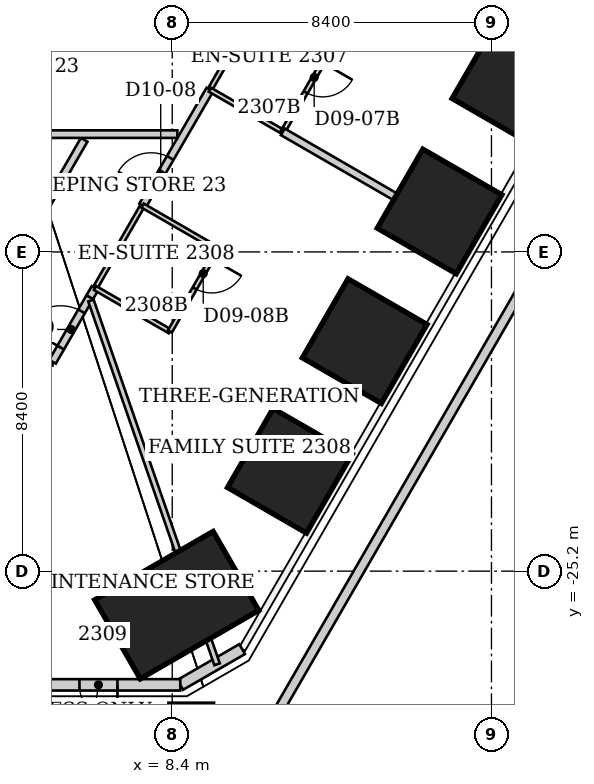
"""IFC4 building model, lengths in metres.
Left out: names, types, materials, properties, quantities, classifications, styles, units other than length and angle.
Written with IfcOpenShell. Run it as: python <this file> out.ifc"""

import sys

from ifc_helpers import new_model, si_unit, direction, frame, frame_2d, origin, origin_2d, place, context, subcontext, project, spatial, rectangle, extrude, clip, halfspace, element, fill, save


model = new_model("IFC4")
c1 = context("Model", 3, precision=1e-05, world=origin(), true_north=direction((0.0, 1.0)))
c2 = subcontext(c1, "Body", "Model", "MODEL_VIEW")
j1 = project(units=[si_unit("LENGTHUNIT", "METRE"), si_unit("PLANEANGLEUNIT", "RADIAN")], contexts=[c1])
p1 = place(None, origin())
s1 = spatial("IfcSite", under=j1, at=p1, CompositionType="ELEMENT")
p2 = place(p1, origin())
s2 = spatial("IfcBuilding", under=s1, at=p2, CompositionType="ELEMENT")
p3 = place(p2, frame((0.0, 0.0, 96.8)))
s3 = spatial("IfcBuildingStorey", under=s2, at=p3, CompositionType="ELEMENT", Elevation=96.8)
p4 = place(p3, frame((17.404, -12.323, -0.048), z_axis=(0.0, 0.0, 1.0), x_axis=(0.866025403784, -0.5, 0.0)))
e1 = element("IfcColumn", 1, at=p4, inside=s3, PredefinedType="COLUMN", context=c2, shape_type="SweptSolid", body=[
    clip(extrude(rectangle(XDim=2.4, YDim=2.4, at=origin_2d()), origin(), (0.0, 0.0, 1.0), 3.848), halfspace(frame((0.0, 0.0, 0.048)), True)),
])
p5 = place(p3, frame((15.434, -15.735, -0.056), z_axis=(0.0, 0.0, 1.0), x_axis=(0.866025403784, -0.5, 0.0)))
e2 = element("IfcColumn", 2, at=p5, inside=s3, PredefinedType="COLUMN", context=c2, shape_type="SweptSolid", body=[
    clip(extrude(rectangle(XDim=2.4, YDim=2.4, at=origin_2d()), origin(), (0.0, 0.0, 1.0), 3.856), halfspace(frame((0.0, 0.0, 0.056)), True)),
])
p6 = place(p3, frame((13.464, -19.147, -0.064), z_axis=(0.0, 0.0, 1.0), x_axis=(0.866025403784, -0.5, 0.0)))
e3 = element("IfcColumn", 3, at=p6, inside=s3, PredefinedType="COLUMN", context=c2, shape_type="SweptSolid", body=[
    clip(extrude(rectangle(XDim=2.4, YDim=2.4, at=origin_2d()), origin(), (0.0, 0.0, 1.0), 3.865), halfspace(frame((0.0, 0.0, 0.064)), True)),
])
p7 = place(p3, frame((11.494, -22.559, -0.073), z_axis=(0.0, 0.0, 1.0), x_axis=(0.866025403784, -0.5, 0.0)))
e4 = element("IfcColumn", 4, at=p7, inside=s3, PredefinedType="COLUMN", context=c2, shape_type="SweptSolid", body=[
    clip(extrude(rectangle(XDim=2.4, YDim=2.4, at=origin_2d()), origin(), (0.0, 0.0, 1.0), 3.873), halfspace(frame((0.0, 0.0, 0.073)), True)),
])
p8 = place(p3, frame((8.518, -26.094, -0.074), z_axis=(0.0, 0.0, 1.0), x_axis=(0.5, -0.866025403784, 0.0)))
e5 = element("IfcColumn", 5, at=p8, inside=s3, PredefinedType="COLUMN", context=c2, shape_type="SweptSolid", body=[
    clip(extrude(rectangle(XDim=2.4, YDim=3.6, at=origin_2d()), origin(), (0.0, 0.0, 1.0), 3.874), halfspace(frame((0.0, 0.0, 0.074)), True)),
])
p9 = place(p3, frame((10.24, -27.252, 0.0), z_axis=(0.0, 0.0, 1.0), x_axis=(-0.866045024864, -0.499966013754, 0.0)))
e6 = element("IfcWall", 6, at=p9, inside=s3, PredefinedType="SOLIDWALL", context=c2, shape_type="SweptSolid", body=[
    extrude(rectangle(XDim=1.88, YDim=0.3, at=frame_2d((0.94, 0.0))), origin(), (0.0, 0.0, 1.0), 3.64),
])
p10 = place(p3, frame((8.611, -28.192, 0.0), z_axis=(0.0, 0.0, 1.0), x_axis=(-1.0, 0.0, 0.0)))
e7 = element("IfcWall", 7, at=p10, inside=s3, PredefinedType="SOLIDWALL", context=c2, shape_type="SweptSolid", body=[
    extrude(rectangle(XDim=4.306, YDim=0.3, at=frame_2d((2.153, 0.0))), origin(), (0.0, 0.0, 1.0), 3.64),
])
p11 = place(p10, frame((1.653, 0.0, 0.0)))
e8 = element("IfcOpeningElement", 8, at=p11, cuts=e7, PredefinedType="OPENING", context=c2, shape_type="SweptSolid", body=[
    extrude(rectangle(XDim=1.0, YDim=2.2, at=frame_2d((0.5, 1.1))), frame((0.0, 0.15, 0.0), z_axis=(0.0, -1.0, 0.0), x_axis=(1.0, 0.0, 0.0)), (0.0, 0.0, 1.0), 0.3),
])
p12 = place(p3, frame((11.024, -29.171, 0.0), z_axis=(0.0, 0.0, 1.0), x_axis=(0.499999235055, 0.866025845425, 0.0)))
e9 = element("IfcWall", 9, at=p12, inside=s3, PredefinedType="PARAPET", context=c2, shape_type="SweptSolid", body=[
    extrude(rectangle(XDim=39.5, YDim=0.25, at=frame_2d((19.75, 0.0))), origin(), (0.0, 0.0, 1.0), 1.1),
])
p13 = place(p3, frame((4.31, -19.69, 0.0), z_axis=(0.0, 0.0, 1.0), x_axis=(1.0, 0.0, 0.0)))
e10 = element("IfcWall", 10, at=p13, inside=s3, PredefinedType="PARTITIONING", context=c2, shape_type="SweptSolid", body=[
    extrude(rectangle(XDim=0.94, YDim=0.2, at=frame_2d((0.47, 0.0))), origin(), (0.0, 0.0, 1.0), 3.64),
])
p14 = place(p3, frame((5.25, -19.69, 0.0), z_axis=(0.0, 0.0, 1.0), x_axis=(0.499431599995, 0.866353321068, 0.0)))
e11 = element("IfcWall", 11, at=p14, inside=s3, PredefinedType="PARTITIONING", context=c2, shape_type="SweptSolid", body=[
    extrude(rectangle(XDim=1.962, YDim=0.2, at=frame_2d((0.981, 0.0))), origin(), (0.0, 0.0, 1.0), 3.64),
])
p15 = place(p14, frame((0.431, 0.0, 0.0)))
e12 = element("IfcOpeningElement", 12, at=p15, cuts=e11, PredefinedType="OPENING", context=c2, shape_type="SweptSolid", body=[
    extrude(rectangle(XDim=1.1, YDim=2.2, at=frame_2d((0.55, 1.1))), frame((0.0, 0.1, 0.0), z_axis=(0.0, -1.0, 0.0), x_axis=(1.0, 0.0, 0.0)), (0.0, 0.0, 1.0), 0.2),
])
p16 = place(p3, frame((6.083, -13.85, 0.0), z_axis=(0.0, 0.0, 1.0), x_axis=(-0.499977643516, -0.866038310922, 0.0)))
e13 = element("IfcWall", 13, at=p16, inside=s3, PredefinedType="PARTITIONING", context=c2, shape_type="SweptSolid", body=[
    extrude(rectangle(XDim=4.665, YDim=0.2, at=frame_2d((2.333, 0.0))), origin(), (0.0, 0.0, 1.0), 3.64),
])
p17 = place(p3, frame((6.23, -17.99, 0.0), z_axis=(0.0, 0.0, 1.0), x_axis=(0.503597773627, 0.863938239921, 0.0)))
e14 = element("IfcWall", 14, at=p17, inside=s3, PredefinedType="PARTITIONING", context=c2, shape_type="SweptSolid", body=[
    extrude(rectangle(XDim=0.278, YDim=0.2, at=frame_2d((0.139, 0.0))), origin(), (0.0, 0.0, 1.0), 3.64),
])
p18 = place(p3, frame((6.37, -17.75, 0.0), z_axis=(0.0, 0.0, 1.0), x_axis=(0.499159685399, 0.866510016372, 0.0)))
e15 = element("IfcWall", 15, at=p18, inside=s3, PredefinedType="PARTITIONING", context=c2, shape_type="SweptSolid", body=[
    extrude(rectangle(XDim=2.504, YDim=0.12, at=frame_2d((1.252, 0.0))), origin(), (0.0, 0.0, 1.0), 3.64),
])
p19 = place(p3, frame((6.37, -17.75, 0.0), z_axis=(0.0, 0.0, 1.0), x_axis=(0.865543766642, -0.500833293649, 0.0)))
e16 = element("IfcWall", 16, at=p19, inside=s3, PredefinedType="PARTITIONING", context=c2, shape_type="SweptSolid", body=[
    extrude(rectangle(XDim=2.276, YDim=0.12, at=frame_2d((1.138, 0.0))), origin(), (0.0, 0.0, 1.0), 3.64),
])
p20 = place(p3, frame((7.62, -15.58, 0.0), z_axis=(0.0, 0.0, 1.0), x_axis=(0.501876608556, 0.864939228954, 0.0)))
e17 = element("IfcWall", 17, at=p20, inside=s3, PredefinedType="PARTITIONING", context=c2, shape_type="SweptSolid", body=[
    extrude(rectangle(XDim=3.526, YDim=0.2, at=frame_2d((1.763, 0.0))), origin(), (0.0, 0.0, 1.0), 3.64),
])
p21 = place(p20, frame((0.45, 0.0, 0.0)))
e18 = element("IfcOpeningElement", 18, at=p21, cuts=e17, PredefinedType="OPENING", context=c2, shape_type="SweptSolid", body=[
    extrude(rectangle(XDim=1.0, YDim=2.13, at=frame_2d((0.5, 1.065))), frame((0.0, 0.1, 0.0), z_axis=(0.0, -1.0, 0.0), x_axis=(1.0, 0.0, 0.0)), (0.0, 0.0, 1.0), 0.2),
])
p22 = place(p3, frame((8.34, -18.89, 0.0), z_axis=(0.0, 0.0, 1.0), x_axis=(0.499159685399, 0.866510016372, 0.0)))
e19 = element("IfcWall", 19, at=p22, inside=s3, PredefinedType="PARTITIONING", context=c2, shape_type="SweptSolid", body=[
    extrude(rectangle(XDim=2.504, YDim=0.12, at=frame_2d((1.252, 0.0))), origin(), (0.0, 0.0, 1.0), 3.64),
])
p23 = place(p22, frame((1.304, 0.0, 0.0)))
e20 = element("IfcOpeningElement", 20, at=p23, cuts=e19, PredefinedType="OPENING", context=c2, shape_type="SweptSolid", body=[
    extrude(rectangle(XDim=0.9, YDim=2.03, at=frame_2d((0.45, 1.015))), frame((0.0, 0.06, 0.0), z_axis=(0.0, -1.0, 0.0), x_axis=(1.0, 0.0, 0.0)), (0.0, 0.0, 1.0), 0.12),
])
p24 = place(p3, frame((8.535, -13.7, 0.0), z_axis=(0.0, 0.0, 1.0), x_axis=(-1.0, 0.0, 0.0)))
e21 = element("IfcWall", 21, at=p24, inside=s3, PredefinedType="PARTITIONING", context=c2, shape_type="SweptSolid", body=[
    extrude(rectangle(XDim=8.705, YDim=0.2, at=frame_2d((4.353, 0.0))), origin(), (0.0, 0.0, 1.0), 3.64),
])
p25 = place(p24, frame((3.802, 0.0, 0.0)))
e22 = element("IfcOpeningElement", 22, at=p25, cuts=e21, PredefinedType="OPENING", context=c2, shape_type="SweptSolid", body=[
    extrude(rectangle(XDim=1.1, YDim=2.2, at=frame_2d((0.55, 1.1))), frame((0.0, 0.1, 0.0), z_axis=(0.0, -1.0, 0.0), x_axis=(1.0, 0.0, 0.0)), (0.0, 0.0, 1.0), 0.2),
])
p26 = place(p3, frame((9.39, -12.53, 0.0), z_axis=(0.0, 0.0, 1.0), x_axis=(0.499769390944, 0.866158505053, 0.0)))
e23 = element("IfcWall", 23, at=p26, inside=s3, PredefinedType="PARTITIONING", context=c2, shape_type="SweptSolid", body=[
    extrude(rectangle(XDim=2.402, YDim=0.12, at=frame_2d((1.201, 0.0))), origin(), (0.0, 0.0, 1.0), 3.64),
])
p27 = place(p3, frame((9.39, -12.53, 0.0), z_axis=(0.0, 0.0, 1.0), x_axis=(0.865732595383, -0.500506816428, 0.0)))
e24 = element("IfcWall", 24, at=p27, inside=s3, PredefinedType="PARTITIONING", context=c2, shape_type="SweptSolid", body=[
    extrude(rectangle(XDim=2.218, YDim=0.12, at=frame_2d((1.109, 0.0))), origin(), (0.0, 0.0, 1.0), 3.64),
])
p28 = place(p3, frame((9.58, -27.652, 0.0), z_axis=(0.0, 0.0, 1.0), x_axis=(-0.327598862793, 0.944816905594, 0.0)))
e25 = element("IfcWall", 25, at=p28, inside=s3, PredefinedType="PARTITIONING", context=c2, shape_type="SweptSolid", body=[
    extrude(rectangle(XDim=10.131, YDim=0.15, at=frame_2d((5.065, 0.0))), origin(), (0.0, 0.0, 1.0), 3.64),
])
p29 = place(p3, frame((9.59, -16.72, 0.0), z_axis=(0.0, 0.0, 1.0), x_axis=(-0.865570669302, 0.500786797394, 0.0)))
e26 = element("IfcWall", 26, at=p29, inside=s3, PredefinedType="PARTITIONING", context=c2, shape_type="SweptSolid", body=[
    extrude(rectangle(XDim=2.276, YDim=0.12, at=frame_2d((1.138, 0.0))), origin(), (0.0, 0.0, 1.0), 3.64),
])
p30 = place(p3, frame((11.31, -13.64, 0.0), z_axis=(0.0, 0.0, 1.0), x_axis=(0.499737123639, 0.866177122335, 0.0)))
e27 = element("IfcWall", 27, at=p30, inside=s3, PredefinedType="PARTITIONING", context=c2, shape_type="SweptSolid", body=[
    extrude(rectangle(XDim=2.401, YDim=0.12, at=frame_2d((1.201, 0.0))), origin(), (0.0, 0.0, 1.0), 3.64),
])
p31 = place(p30, frame((1.201, 0.0, 0.0)))
e28 = element("IfcOpeningElement", 28, at=p31, cuts=e27, PredefinedType="OPENING", context=c2, shape_type="SweptSolid", body=[
    extrude(rectangle(XDim=0.9, YDim=2.03, at=frame_2d((0.45, 1.015))), frame((0.0, 0.06, 0.0), z_axis=(0.0, -1.0, 0.0), x_axis=(1.0, 0.0, 0.0)), (0.0, 0.0, 1.0), 0.12),
])
p32 = place(p3, frame((11.31, -13.64, 0.0), z_axis=(0.0, 0.0, 1.0), x_axis=(0.865919350456, -0.50018364478, 0.0)))
e29 = element("IfcWall", 29, at=p32, inside=s3, PredefinedType="PARTITIONING", context=c2, shape_type="SweptSolid", body=[
    extrude(rectangle(XDim=5.758, YDim=0.2, at=frame_2d((2.879, 0.0))), origin(), (0.0, 0.0, 1.0), 3.64),
])
p33 = place(p3, frame((12.51, -11.56, 0.0), z_axis=(0.0, 0.0, 1.0), x_axis=(-0.865705017107, 0.500554515868, 0.0)))
e30 = element("IfcWall", 30, at=p33, inside=s3, PredefinedType="PARTITIONING", context=c2, shape_type="SweptSolid", body=[
    extrude(rectangle(XDim=2.218, YDim=0.12, at=frame_2d((1.109, 0.0))), origin(), (0.0, 0.0, 1.0), 3.64),
])
p34 = place(p11, origin())
e31 = element("IfcDoor", 31, at=p34, inside=s3, OperationType="SINGLE_SWING_LEFT", PredefinedType="DOOR", context=c2, shape_type="SweptSolid", body=[
    extrude(rectangle(XDim=1.0, YDim=2.2, at=frame_2d((0.5, 1.1))), frame((0.0, 0.025, 0.0), z_axis=(0.0, -1.0, 0.0), x_axis=(1.0, 0.0, 0.0)), (0.0, 0.0, 1.0), 0.05),
])
fill(e8, e31)
p35 = place(p3, frame((0.0, 0.0, -0.2)))
p36 = place(p35, frame((8.9, -29.112, 0.0)))
p37 = place(p36, frame((0.0, 0.0, 0.15)))
e32 = element("IfcWindow", 32, at=p37, inside=s3, PartitioningType="SINGLE_PANEL", PredefinedType="SKYLIGHT", context=c2, shape_type="SweptSolid", body=[
    extrude(rectangle(XDim=1.2, YDim=0.9, at=origin_2d()), origin(), (0.0, 0.0, 1.0), 0.05),
])
p38 = place(p31, origin())
e33 = element("IfcDoor", 33, at=p38, inside=s3, OperationType="SINGLE_SWING_RIGHT", PredefinedType="DOOR", context=c2, shape_type="SweptSolid", body=[
    extrude(rectangle(XDim=0.9, YDim=2.03, at=frame_2d((0.45, 1.015))), frame((0.0, 0.025, 0.0), z_axis=(0.0, -1.0, 0.0), x_axis=(1.0, 0.0, 0.0)), (0.0, 0.0, 1.0), 0.05),
])
fill(e28, e33)
p39 = place(p21, origin())
e34 = element("IfcDoor", 34, at=p39, inside=s3, OperationType="SINGLE_SWING_LEFT", PredefinedType="DOOR", context=c2, shape_type="SweptSolid", body=[
    extrude(rectangle(XDim=1.0, YDim=2.13, at=frame_2d((0.5, 1.065))), frame((0.0, 0.025, 0.0), z_axis=(0.0, -1.0, 0.0), x_axis=(1.0, 0.0, 0.0)), (0.0, 0.0, 1.0), 0.05),
])
fill(e18, e34)
p40 = place(p23, origin())
e35 = element("IfcDoor", 35, at=p40, inside=s3, OperationType="SINGLE_SWING_RIGHT", PredefinedType="DOOR", context=c2, shape_type="SweptSolid", body=[
    extrude(rectangle(XDim=0.9, YDim=2.03, at=frame_2d((0.45, 1.015))), frame((0.0, 0.025, 0.0), z_axis=(0.0, -1.0, 0.0), x_axis=(1.0, 0.0, 0.0)), (0.0, 0.0, 1.0), 0.05),
])
fill(e20, e35)
p41 = place(p15, origin())
e36 = element("IfcDoor", 36, at=p41, inside=s3, OperationType="SINGLE_SWING_LEFT", PredefinedType="DOOR", context=c2, shape_type="SweptSolid", body=[
    extrude(rectangle(XDim=1.1, YDim=2.2, at=frame_2d((0.55, 1.1))), frame((0.0, 0.025, 0.0), z_axis=(0.0, -1.0, 0.0), x_axis=(1.0, 0.0, 0.0)), (0.0, 0.0, 1.0), 0.05),
])
fill(e12, e36)
save(model, sys.argv[1])
